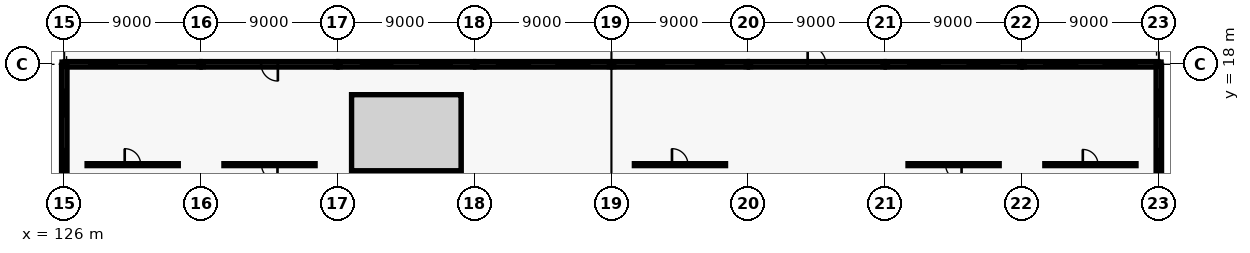
"""IFC4 building model, lengths in metres.
Left out: names, types, materials, properties, quantities, classifications, styles, units other than length and angle.
Written with IfcOpenShell. Run it as: python <this file> out.ifc"""

import sys

from ifc_helpers import new_model, si_unit, direction, frame, frame_2d, origin, origin_2d, place, context, subcontext, project, spatial, rectangle, i_section, extrude, element, fill, save


model = new_model("IFC4")
c1 = context("Model", 3, precision=1e-05, world=origin(), true_north=direction((0.0, 1.0)))
c2 = subcontext(c1, "Body", "Model", "MODEL_VIEW")
j1 = project(units=[si_unit("LENGTHUNIT", "METRE"), si_unit("PLANEANGLEUNIT", "RADIAN")], contexts=[c1])
p1 = place(None, origin())
s1 = spatial("IfcSite", under=j1, at=p1, CompositionType="ELEMENT")
p2 = place(p1, origin())
s2 = spatial("IfcBuilding", under=s1, at=p2, CompositionType="ELEMENT")
p3 = place(p2, frame((0.0, 0.0, 9.6)))
s3 = spatial("IfcBuildingStorey", under=s2, at=p3, CompositionType="ELEMENT", Elevation=9.6)
for number, where, z_axis, x_axis in (
    (1, (126.0, 18.0, 0.0), (0.0, 0.0, 1.0), (1.0, 0.0, 0.0)),
    (2, (135.0, 18.0, 0.0), (0.0, 0.0, 1.0), (1.0, 0.0, 0.0)),
    (3, (144.0, 18.0, 0.0), (0.0, 0.0, 1.0), (1.0, 0.0, 0.0)),
    (4, (153.0, 18.0, 0.0), (0.0, 0.0, 1.0), (1.0, 0.0, 0.0)),
    (5, (162.0, 18.0, 0.0), (0.0, 0.0, 1.0), (1.0, 0.0, 0.0)),
    (6, (171.0, 18.0, 0.0), (0.0, 0.0, 1.0), (1.0, 0.0, 0.0)),
    (7, (180.0, 18.0, 0.0), (0.0, 0.0, 1.0), (1.0, 0.0, 0.0)),
    (8, (189.0, 18.0, 0.0), (0.0, 0.0, 1.0), (1.0, 0.0, 0.0)),
    (9, (198.0, 18.0, 0.0), (0.0, 0.0, 1.0), (1.0, 0.0, 0.0)),
):
    element("IfcColumn", number, at=place(p3, frame(where, z_axis=z_axis, x_axis=x_axis)), inside=s3, PredefinedType="COLUMN", context=c2, shape_type="SweptSolid", body=[
        extrude(i_section(OverallWidth=0.3, OverallDepth=0.3, WebThickness=0.011, FlangeThickness=0.019, FilletRadius=0.027, at=origin_2d()), origin(), (0.0, 0.0, 1.0), 3.9),
    ])
p4 = place(p3, frame((126.06, 18.0, 0.0), z_axis=(0.0, 0.0, 1.0), x_axis=(1.0, 0.0, 0.0)))
e10 = element("IfcWall", 10, at=p4, inside=s3, PredefinedType="SOLIDWALL", context=c2, shape_type="SweptSolid", body=[
    extrude(rectangle(XDim=8.88, YDim=0.36, at=frame_2d((4.44, 0.0))), origin(), (0.0, 0.0, 1.0), 3.25),
])
p5 = place(p4, frame((1.586, 0.0, 0.9)))
e11 = element("IfcOpeningElement", 11, at=p5, cuts=e10, PredefinedType="OPENING", context=c2, shape_type="SweptSolid", body=[
    extrude(rectangle(XDim=1.8, YDim=1.8, at=frame_2d((0.9, 0.9))), frame((0.0, 0.19, 0.0), z_axis=(0.0, -1.0, 0.0), x_axis=(1.0, 0.0, 0.0)), (0.0, 0.0, 1.0), 0.38),
])
p6 = place(p4, frame((5.494, 0.0, 0.9)))
e12 = element("IfcOpeningElement", 12, at=p6, cuts=e10, PredefinedType="OPENING", context=c2, shape_type="SweptSolid", body=[
    extrude(rectangle(XDim=1.8, YDim=1.8, at=frame_2d((0.9, 0.9))), frame((0.0, 0.19, 0.0), z_axis=(0.0, -1.0, 0.0), x_axis=(1.0, 0.0, 0.0)), (0.0, 0.0, 1.0), 0.38),
])
p7 = place(p3, frame((135.06, 18.0, 0.0), z_axis=(0.0, 0.0, 1.0), x_axis=(1.0, 0.0, 0.0)))
e13 = element("IfcWall", 13, at=p7, inside=s3, PredefinedType="SOLIDWALL", context=c2, shape_type="SweptSolid", body=[
    extrude(rectangle(XDim=8.88, YDim=0.36, at=frame_2d((4.44, 0.0))), origin(), (0.0, 0.0, 1.0), 3.25),
])
p8 = place(p7, frame((3.89, 0.0, 0.0)))
e14 = element("IfcOpeningElement", 14, at=p8, cuts=e13, PredefinedType="OPENING", context=c2, shape_type="SweptSolid", body=[
    extrude(rectangle(XDim=1.1, YDim=2.15, at=frame_2d((0.55, 1.075))), frame((0.0, 0.19, 0.0), z_axis=(0.0, -1.0, 0.0), x_axis=(1.0, 0.0, 0.0)), (0.0, 0.0, 1.0), 0.38),
])
p9 = place(p3, frame((144.06, 18.0, 0.0), z_axis=(0.0, 0.0, 1.0), x_axis=(1.0, 0.0, 0.0)))
e15 = element("IfcWall", 15, at=p9, inside=s3, PredefinedType="SOLIDWALL", context=c2, shape_type="SweptSolid", body=[
    extrude(rectangle(XDim=8.88, YDim=0.36, at=frame_2d((4.44, 0.0))), origin(), (0.0, 0.0, 1.0), 3.25),
])
p10 = place(p9, frame((1.461, 0.0, 0.9)))
e16 = element("IfcOpeningElement", 16, at=p10, cuts=e15, PredefinedType="OPENING", context=c2, shape_type="SweptSolid", body=[
    extrude(rectangle(XDim=2.05, YDim=1.9, at=frame_2d((1.025, 0.95))), frame((0.0, 0.19, 0.0), z_axis=(0.0, -1.0, 0.0), x_axis=(1.0, 0.0, 0.0)), (0.0, 0.0, 1.0), 0.38),
])
p11 = place(p9, frame((5.369, 0.0, 0.9)))
e17 = element("IfcOpeningElement", 17, at=p11, cuts=e15, PredefinedType="OPENING", context=c2, shape_type="SweptSolid", body=[
    extrude(rectangle(XDim=2.05, YDim=1.9, at=frame_2d((1.025, 0.95))), frame((0.0, 0.19, 0.0), z_axis=(0.0, -1.0, 0.0), x_axis=(1.0, 0.0, 0.0)), (0.0, 0.0, 1.0), 0.38),
])
p12 = place(p3, frame((153.06, 18.0, 0.0), z_axis=(0.0, 0.0, 1.0), x_axis=(1.0, 0.0, 0.0)))
e18 = element("IfcWall", 18, at=p12, inside=s3, PredefinedType="SOLIDWALL", context=c2, shape_type="SweptSolid", body=[
    extrude(rectangle(XDim=8.88, YDim=0.36, at=frame_2d((4.44, 0.0))), origin(), (0.0, 0.0, 1.0), 3.25),
])
p13 = place(p12, frame((1.411, 0.0, 0.9)))
e19 = element("IfcOpeningElement", 19, at=p13, cuts=e18, PredefinedType="OPENING", context=c2, shape_type="SweptSolid", body=[
    extrude(rectangle(XDim=2.15, YDim=1.75, at=frame_2d((1.075, 0.875))), frame((0.0, 0.19, 0.0), z_axis=(0.0, -1.0, 0.0), x_axis=(1.0, 0.0, 0.0)), (0.0, 0.0, 1.0), 0.38),
])
p14 = place(p12, frame((5.319, 0.0, 0.9)))
e20 = element("IfcOpeningElement", 20, at=p14, cuts=e18, PredefinedType="OPENING", context=c2, shape_type="SweptSolid", body=[
    extrude(rectangle(XDim=2.15, YDim=1.75, at=frame_2d((1.075, 0.875))), frame((0.0, 0.19, 0.0), z_axis=(0.0, -1.0, 0.0), x_axis=(1.0, 0.0, 0.0)), (0.0, 0.0, 1.0), 0.38),
])
p15 = place(p3, frame((162.06, 18.0, 0.0), z_axis=(0.0, 0.0, 1.0), x_axis=(1.0, 0.0, 0.0)))
e21 = element("IfcWall", 21, at=p15, inside=s3, PredefinedType="SOLIDWALL", context=c2, shape_type="SweptSolid", body=[
    extrude(rectangle(XDim=8.88, YDim=0.36, at=frame_2d((4.44, 0.0))), origin(), (0.0, 0.0, 1.0), 3.25),
])
p16 = place(p15, frame((1.586, 0.0, 0.9)))
e22 = element("IfcOpeningElement", 22, at=p16, cuts=e21, PredefinedType="OPENING", context=c2, shape_type="SweptSolid", body=[
    extrude(rectangle(XDim=1.8, YDim=1.8, at=frame_2d((0.9, 0.9))), frame((0.0, 0.19, 0.0), z_axis=(0.0, -1.0, 0.0), x_axis=(1.0, 0.0, 0.0)), (0.0, 0.0, 1.0), 0.38),
])
p17 = place(p15, frame((5.494, 0.0, 0.9)))
e23 = element("IfcOpeningElement", 23, at=p17, cuts=e21, PredefinedType="OPENING", context=c2, shape_type="SweptSolid", body=[
    extrude(rectangle(XDim=1.8, YDim=1.8, at=frame_2d((0.9, 0.9))), frame((0.0, 0.19, 0.0), z_axis=(0.0, -1.0, 0.0), x_axis=(1.0, 0.0, 0.0)), (0.0, 0.0, 1.0), 0.38),
])
p18 = place(p3, frame((171.06, 18.0, 0.0), z_axis=(0.0, 0.0, 1.0), x_axis=(1.0, 0.0, 0.0)))
e24 = element("IfcWall", 24, at=p18, inside=s3, PredefinedType="SOLIDWALL", context=c2, shape_type="SweptSolid", body=[
    extrude(rectangle(XDim=8.88, YDim=0.36, at=frame_2d((4.44, 0.0))), origin(), (0.0, 0.0, 1.0), 3.25),
])
p19 = place(p18, frame((3.84, 0.0, 0.0)))
e25 = element("IfcOpeningElement", 25, at=p19, cuts=e24, PredefinedType="OPENING", context=c2, shape_type="SweptSolid", body=[
    extrude(rectangle(XDim=1.2, YDim=2.15, at=frame_2d((0.6, 1.075))), frame((0.0, 0.19, 0.0), z_axis=(0.0, -1.0, 0.0), x_axis=(1.0, 0.0, 0.0)), (0.0, 0.0, 1.0), 0.38),
])
p20 = place(p3, frame((180.06, 18.0, 0.0), z_axis=(0.0, 0.0, 1.0), x_axis=(1.0, 0.0, 0.0)))
e26 = element("IfcWall", 26, at=p20, inside=s3, PredefinedType="SOLIDWALL", context=c2, shape_type="SweptSolid", body=[
    extrude(rectangle(XDim=8.88, YDim=0.36, at=frame_2d((4.44, 0.0))), origin(), (0.0, 0.0, 1.0), 3.25),
])
p21 = place(p20, frame((1.461, 0.0, 0.9)))
e27 = element("IfcOpeningElement", 27, at=p21, cuts=e26, PredefinedType="OPENING", context=c2, shape_type="SweptSolid", body=[
    extrude(rectangle(XDim=2.05, YDim=1.9, at=frame_2d((1.025, 0.95))), frame((0.0, 0.19, 0.0), z_axis=(0.0, -1.0, 0.0), x_axis=(1.0, 0.0, 0.0)), (0.0, 0.0, 1.0), 0.38),
])
p22 = place(p20, frame((5.369, 0.0, 0.9)))
e28 = element("IfcOpeningElement", 28, at=p22, cuts=e26, PredefinedType="OPENING", context=c2, shape_type="SweptSolid", body=[
    extrude(rectangle(XDim=2.05, YDim=1.9, at=frame_2d((1.025, 0.95))), frame((0.0, 0.19, 0.0), z_axis=(0.0, -1.0, 0.0), x_axis=(1.0, 0.0, 0.0)), (0.0, 0.0, 1.0), 0.38),
])
p23 = place(p3, frame((189.06, 18.0, 0.0), z_axis=(0.0, 0.0, 1.0), x_axis=(1.0, 0.0, 0.0)))
e29 = element("IfcWall", 29, at=p23, inside=s3, PredefinedType="SOLIDWALL", context=c2, shape_type="SweptSolid", body=[
    extrude(rectangle(XDim=8.88, YDim=0.36, at=frame_2d((4.44, 0.0))), origin(), (0.0, 0.0, 1.0), 3.25),
])
p24 = place(p23, frame((1.411, 0.0, 0.9)))
e30 = element("IfcOpeningElement", 30, at=p24, cuts=e29, PredefinedType="OPENING", context=c2, shape_type="SweptSolid", body=[
    extrude(rectangle(XDim=2.15, YDim=1.75, at=frame_2d((1.075, 0.875))), frame((0.0, 0.19, 0.0), z_axis=(0.0, -1.0, 0.0), x_axis=(1.0, 0.0, 0.0)), (0.0, 0.0, 1.0), 0.38),
])
p25 = place(p23, frame((5.319, 0.0, 0.9)))
e31 = element("IfcOpeningElement", 31, at=p25, cuts=e29, PredefinedType="OPENING", context=c2, shape_type="SweptSolid", body=[
    extrude(rectangle(XDim=2.15, YDim=1.75, at=frame_2d((1.075, 0.875))), frame((0.0, 0.19, 0.0), z_axis=(0.0, -1.0, 0.0), x_axis=(1.0, 0.0, 0.0)), (0.0, 0.0, 1.0), 0.38),
])
p26 = place(p3, frame((126.0, 9.06, 0.0), z_axis=(0.0, 0.0, 1.0), x_axis=(0.0, 1.0, 0.0)))
e32 = element("IfcWall", 32, at=p26, inside=s3, PredefinedType="SOLIDWALL", context=c2, shape_type="SweptSolid", body=[
    extrude(rectangle(XDim=8.88, YDim=0.36, at=frame_2d((4.44, 0.0))), origin(), (0.0, 0.0, 1.0), 3.25),
])
p27 = place(p26, frame((1.611, 0.0, 0.9)))
e33 = element("IfcOpeningElement", 33, at=p27, cuts=e32, PredefinedType="OPENING", context=c2, shape_type="SweptSolid", body=[
    extrude(rectangle(XDim=1.75, YDim=2.25, at=frame_2d((0.875, 1.125))), frame((0.0, 0.19, 0.0), z_axis=(0.0, -1.0, 0.0), x_axis=(1.0, 0.0, 0.0)), (0.0, 0.0, 1.0), 0.38),
])
p28 = place(p26, frame((5.519, 0.0, 0.9)))
e34 = element("IfcOpeningElement", 34, at=p28, cuts=e32, PredefinedType="OPENING", context=c2, shape_type="SweptSolid", body=[
    extrude(rectangle(XDim=1.75, YDim=2.25, at=frame_2d((0.875, 1.125))), frame((0.0, 0.19, 0.0), z_axis=(0.0, -1.0, 0.0), x_axis=(1.0, 0.0, 0.0)), (0.0, 0.0, 1.0), 0.38),
])
p29 = place(p3, frame((198.0, 9.06, 0.0), z_axis=(0.0, 0.0, 1.0), x_axis=(0.0, 1.0, 0.0)))
e35 = element("IfcWall", 35, at=p29, inside=s3, PredefinedType="SOLIDWALL", context=c2, shape_type="SweptSolid", body=[
    extrude(rectangle(XDim=8.88, YDim=0.36, at=frame_2d((4.44, 0.0))), origin(), (0.0, 0.0, 1.0), 3.25),
])
p30 = place(p29, frame((1.611, 0.0, 0.9)))
e36 = element("IfcOpeningElement", 36, at=p30, cuts=e35, PredefinedType="OPENING", context=c2, shape_type="SweptSolid", body=[
    extrude(rectangle(XDim=1.75, YDim=2.25, at=frame_2d((0.875, 1.125))), frame((0.0, 0.19, 0.0), z_axis=(0.0, -1.0, 0.0), x_axis=(1.0, 0.0, 0.0)), (0.0, 0.0, 1.0), 0.38),
])
p31 = place(p29, frame((5.519, 0.0, 0.9)))
e37 = element("IfcOpeningElement", 37, at=p31, cuts=e35, PredefinedType="OPENING", context=c2, shape_type="SweptSolid", body=[
    extrude(rectangle(XDim=1.75, YDim=2.25, at=frame_2d((0.875, 1.125))), frame((0.0, 0.19, 0.0), z_axis=(0.0, -1.0, 0.0), x_axis=(1.0, 0.0, 0.0)), (0.0, 0.0, 1.0), 0.38),
])
p32 = place(p3, frame((127.5, 11.4, 0.0), z_axis=(0.0, 0.0, 1.0), x_axis=(1.0, 0.0, 0.0)))
e38 = element("IfcWall", 38, at=p32, inside=s3, PredefinedType="PARTITIONING", context=c2, shape_type="SweptSolid", body=[
    extrude(rectangle(XDim=6.0, YDim=0.13, at=frame_2d((3.0, 0.0))), origin(), (0.0, 0.0, 1.0), 2.9),
])
p33 = place(p32, frame((2.475, 0.0, 0.0)))
e39 = element("IfcOpeningElement", 39, at=p33, cuts=e38, PredefinedType="OPENING", context=c2, shape_type="SweptSolid", body=[
    extrude(rectangle(XDim=1.05, YDim=2.15, at=frame_2d((0.525, 1.075))), frame((0.0, 0.075, 0.0), z_axis=(0.0, -1.0, 0.0), x_axis=(1.0, 0.0, 0.0)), (0.0, 0.0, 1.0), 0.15),
])
p34 = place(p3, frame((136.5, 11.4, 0.0), z_axis=(0.0, 0.0, 1.0), x_axis=(1.0, 0.0, 0.0)))
e40 = element("IfcWall", 40, at=p34, inside=s3, PredefinedType="PARTITIONING", context=c2, shape_type="SweptSolid", body=[
    extrude(rectangle(XDim=6.0, YDim=0.13, at=frame_2d((3.0, 0.0))), origin(), (0.0, 0.0, 1.0), 2.9),
])
p35 = place(p34, frame((2.475, 0.0, 0.0)))
e41 = element("IfcOpeningElement", 41, at=p35, cuts=e40, PredefinedType="OPENING", context=c2, shape_type="SweptSolid", body=[
    extrude(rectangle(XDim=1.05, YDim=2.15, at=frame_2d((0.525, 1.075))), frame((0.0, 0.075, 0.0), z_axis=(0.0, -1.0, 0.0), x_axis=(1.0, 0.0, 0.0)), (0.0, 0.0, 1.0), 0.15),
])
p36 = place(p3, frame((163.5, 11.4, 0.0), z_axis=(0.0, 0.0, 1.0), x_axis=(1.0, 0.0, 0.0)))
e42 = element("IfcWall", 42, at=p36, inside=s3, PredefinedType="PARTITIONING", context=c2, shape_type="SweptSolid", body=[
    extrude(rectangle(XDim=6.0, YDim=0.13, at=frame_2d((3.0, 0.0))), origin(), (0.0, 0.0, 1.0), 2.9),
])
p37 = place(p36, frame((2.475, 0.0, 0.0)))
e43 = element("IfcOpeningElement", 43, at=p37, cuts=e42, PredefinedType="OPENING", context=c2, shape_type="SweptSolid", body=[
    extrude(rectangle(XDim=1.05, YDim=2.15, at=frame_2d((0.525, 1.075))), frame((0.0, 0.075, 0.0), z_axis=(0.0, -1.0, 0.0), x_axis=(1.0, 0.0, 0.0)), (0.0, 0.0, 1.0), 0.15),
])
p38 = place(p3, frame((181.5, 11.4, 0.0), z_axis=(0.0, 0.0, 1.0), x_axis=(1.0, 0.0, 0.0)))
e44 = element("IfcWall", 44, at=p38, inside=s3, PredefinedType="PARTITIONING", context=c2, shape_type="SweptSolid", body=[
    extrude(rectangle(XDim=6.0, YDim=0.13, at=frame_2d((3.0, 0.0))), origin(), (0.0, 0.0, 1.0), 2.9),
])
p39 = place(p38, frame((2.475, 0.0, 0.0)))
e45 = element("IfcOpeningElement", 45, at=p39, cuts=e44, PredefinedType="OPENING", context=c2, shape_type="SweptSolid", body=[
    extrude(rectangle(XDim=1.05, YDim=2.15, at=frame_2d((0.525, 1.075))), frame((0.0, 0.075, 0.0), z_axis=(0.0, -1.0, 0.0), x_axis=(1.0, 0.0, 0.0)), (0.0, 0.0, 1.0), 0.15),
])
p40 = place(p3, frame((190.5, 11.4, 0.0), z_axis=(0.0, 0.0, 1.0), x_axis=(1.0, 0.0, 0.0)))
e46 = element("IfcWall", 46, at=p40, inside=s3, PredefinedType="PARTITIONING", context=c2, shape_type="SweptSolid", body=[
    extrude(rectangle(XDim=6.0, YDim=0.13, at=frame_2d((3.0, 0.0))), origin(), (0.0, 0.0, 1.0), 2.9),
])
p41 = place(p40, frame((2.5, 0.0, 0.0)))
e47 = element("IfcOpeningElement", 47, at=p41, cuts=e46, PredefinedType="OPENING", context=c2, shape_type="SweptSolid", body=[
    extrude(rectangle(XDim=1.0, YDim=2.1, at=frame_2d((0.5, 1.05))), frame((0.0, 0.075, 0.0), z_axis=(0.0, -1.0, 0.0), x_axis=(1.0, 0.0, 0.0)), (0.0, 0.0, 1.0), 0.15),
])
p42 = place(p5, origin())
e48 = element("IfcWindow", 48, at=p42, inside=s3, PartitioningType="SINGLE_PANEL", PredefinedType="WINDOW", context=c2, shape_type="SweptSolid", body=[
    extrude(rectangle(XDim=1.8, YDim=1.8, at=frame_2d((0.9, 0.9))), frame((0.0, 0.03, 0.0), z_axis=(0.0, -1.0, 0.0), x_axis=(1.0, 0.0, 0.0)), (0.0, 0.0, 1.0), 0.06),
])
fill(e11, e48)
p43 = place(p6, origin())
e49 = element("IfcWindow", 49, at=p43, inside=s3, PartitioningType="SINGLE_PANEL", PredefinedType="WINDOW", context=c2, shape_type="SweptSolid", body=[
    extrude(rectangle(XDim=1.8, YDim=1.8, at=frame_2d((0.9, 0.9))), frame((0.0, 0.03, 0.0), z_axis=(0.0, -1.0, 0.0), x_axis=(1.0, 0.0, 0.0)), (0.0, 0.0, 1.0), 0.06),
])
fill(e12, e49)
p44 = place(p8, origin())
e50 = element("IfcDoor", 50, at=p44, inside=s3, OperationType="SINGLE_SWING_RIGHT", PredefinedType="DOOR", context=c2, shape_type="SweptSolid", body=[
    extrude(rectangle(XDim=1.1, YDim=2.15, at=frame_2d((0.55, 1.075))), frame((0.0, 0.025, 0.0), z_axis=(0.0, -1.0, 0.0), x_axis=(1.0, 0.0, 0.0)), (0.0, 0.0, 1.0), 0.05),
])
fill(e14, e50)
p45 = place(p10, origin())
e51 = element("IfcWindow", 51, at=p45, inside=s3, PartitioningType="SINGLE_PANEL", PredefinedType="WINDOW", context=c2, shape_type="SweptSolid", body=[
    extrude(rectangle(XDim=2.05, YDim=1.9, at=frame_2d((1.025, 0.95))), frame((0.0, 0.03, 0.0), z_axis=(0.0, -1.0, 0.0), x_axis=(1.0, 0.0, 0.0)), (0.0, 0.0, 1.0), 0.06),
])
fill(e16, e51)
p46 = place(p11, origin())
e52 = element("IfcWindow", 52, at=p46, inside=s3, PartitioningType="SINGLE_PANEL", PredefinedType="WINDOW", context=c2, shape_type="SweptSolid", body=[
    extrude(rectangle(XDim=2.05, YDim=1.9, at=frame_2d((1.025, 0.95))), frame((0.0, 0.03, 0.0), z_axis=(0.0, -1.0, 0.0), x_axis=(1.0, 0.0, 0.0)), (0.0, 0.0, 1.0), 0.06),
])
fill(e17, e52)
p47 = place(p13, origin())
e53 = element("IfcWindow", 53, at=p47, inside=s3, PartitioningType="SINGLE_PANEL", PredefinedType="WINDOW", context=c2, shape_type="SweptSolid", body=[
    extrude(rectangle(XDim=2.15, YDim=1.75, at=frame_2d((1.075, 0.875))), frame((0.0, 0.03, 0.0), z_axis=(0.0, -1.0, 0.0), x_axis=(1.0, 0.0, 0.0)), (0.0, 0.0, 1.0), 0.06),
])
fill(e19, e53)
p48 = place(p14, origin())
e54 = element("IfcWindow", 54, at=p48, inside=s3, PartitioningType="SINGLE_PANEL", PredefinedType="WINDOW", context=c2, shape_type="SweptSolid", body=[
    extrude(rectangle(XDim=2.15, YDim=1.75, at=frame_2d((1.075, 0.875))), frame((0.0, 0.03, 0.0), z_axis=(0.0, -1.0, 0.0), x_axis=(1.0, 0.0, 0.0)), (0.0, 0.0, 1.0), 0.06),
])
fill(e20, e54)
p49 = place(p16, origin())
e55 = element("IfcWindow", 55, at=p49, inside=s3, PartitioningType="SINGLE_PANEL", PredefinedType="WINDOW", context=c2, shape_type="SweptSolid", body=[
    extrude(rectangle(XDim=1.8, YDim=1.8, at=frame_2d((0.9, 0.9))), frame((0.0, 0.03, 0.0), z_axis=(0.0, -1.0, 0.0), x_axis=(1.0, 0.0, 0.0)), (0.0, 0.0, 1.0), 0.06),
])
fill(e22, e55)
p50 = place(p17, origin())
e56 = element("IfcWindow", 56, at=p50, inside=s3, PartitioningType="SINGLE_PANEL", PredefinedType="WINDOW", context=c2, shape_type="SweptSolid", body=[
    extrude(rectangle(XDim=1.8, YDim=1.8, at=frame_2d((0.9, 0.9))), frame((0.0, 0.03, 0.0), z_axis=(0.0, -1.0, 0.0), x_axis=(1.0, 0.0, 0.0)), (0.0, 0.0, 1.0), 0.06),
])
fill(e23, e56)
p51 = place(p19, origin())
e57 = element("IfcDoor", 57, at=p51, inside=s3, OperationType="SINGLE_SWING_LEFT", PredefinedType="DOOR", context=c2, shape_type="SweptSolid", body=[
    extrude(rectangle(XDim=1.2, YDim=2.15, at=frame_2d((0.6, 1.075))), frame((0.0, 0.025, 0.0), z_axis=(0.0, -1.0, 0.0), x_axis=(1.0, 0.0, 0.0)), (0.0, 0.0, 1.0), 0.05),
])
fill(e25, e57)
p52 = place(p21, origin())
e58 = element("IfcWindow", 58, at=p52, inside=s3, PartitioningType="SINGLE_PANEL", PredefinedType="WINDOW", context=c2, shape_type="SweptSolid", body=[
    extrude(rectangle(XDim=2.05, YDim=1.9, at=frame_2d((1.025, 0.95))), frame((0.0, 0.03, 0.0), z_axis=(0.0, -1.0, 0.0), x_axis=(1.0, 0.0, 0.0)), (0.0, 0.0, 1.0), 0.06),
])
fill(e27, e58)
p53 = place(p22, origin())
e59 = element("IfcWindow", 59, at=p53, inside=s3, PartitioningType="SINGLE_PANEL", PredefinedType="WINDOW", context=c2, shape_type="SweptSolid", body=[
    extrude(rectangle(XDim=2.05, YDim=1.9, at=frame_2d((1.025, 0.95))), frame((0.0, 0.03, 0.0), z_axis=(0.0, -1.0, 0.0), x_axis=(1.0, 0.0, 0.0)), (0.0, 0.0, 1.0), 0.06),
])
fill(e28, e59)
p54 = place(p24, origin())
e60 = element("IfcWindow", 60, at=p54, inside=s3, PartitioningType="SINGLE_PANEL", PredefinedType="WINDOW", context=c2, shape_type="SweptSolid", body=[
    extrude(rectangle(XDim=2.15, YDim=1.75, at=frame_2d((1.075, 0.875))), frame((0.0, 0.03, 0.0), z_axis=(0.0, -1.0, 0.0), x_axis=(1.0, 0.0, 0.0)), (0.0, 0.0, 1.0), 0.06),
])
fill(e30, e60)
p55 = place(p25, origin())
e61 = element("IfcWindow", 61, at=p55, inside=s3, PartitioningType="SINGLE_PANEL", PredefinedType="WINDOW", context=c2, shape_type="SweptSolid", body=[
    extrude(rectangle(XDim=2.15, YDim=1.75, at=frame_2d((1.075, 0.875))), frame((0.0, 0.03, 0.0), z_axis=(0.0, -1.0, 0.0), x_axis=(1.0, 0.0, 0.0)), (0.0, 0.0, 1.0), 0.06),
])
fill(e31, e61)
p56 = place(p27, origin())
e62 = element("IfcWindow", 62, at=p56, inside=s3, PartitioningType="SINGLE_PANEL", PredefinedType="WINDOW", context=c2, shape_type="SweptSolid", body=[
    extrude(rectangle(XDim=1.75, YDim=2.25, at=frame_2d((0.875, 1.125))), frame((0.0, 0.03, 0.0), z_axis=(0.0, -1.0, 0.0), x_axis=(1.0, 0.0, 0.0)), (0.0, 0.0, 1.0), 0.06),
])
fill(e33, e62)
p57 = place(p28, origin())
e63 = element("IfcWindow", 63, at=p57, inside=s3, PartitioningType="SINGLE_PANEL", PredefinedType="WINDOW", context=c2, shape_type="SweptSolid", body=[
    extrude(rectangle(XDim=1.75, YDim=2.25, at=frame_2d((0.875, 1.125))), frame((0.0, 0.03, 0.0), z_axis=(0.0, -1.0, 0.0), x_axis=(1.0, 0.0, 0.0)), (0.0, 0.0, 1.0), 0.06),
])
fill(e34, e63)
p58 = place(p30, origin())
e64 = element("IfcWindow", 64, at=p58, inside=s3, PartitioningType="SINGLE_PANEL", PredefinedType="WINDOW", context=c2, shape_type="SweptSolid", body=[
    extrude(rectangle(XDim=1.75, YDim=2.25, at=frame_2d((0.875, 1.125))), frame((0.0, 0.03, 0.0), z_axis=(0.0, -1.0, 0.0), x_axis=(1.0, 0.0, 0.0)), (0.0, 0.0, 1.0), 0.06),
])
fill(e36, e64)
p59 = place(p31, origin())
e65 = element("IfcWindow", 65, at=p59, inside=s3, PartitioningType="SINGLE_PANEL", PredefinedType="WINDOW", context=c2, shape_type="SweptSolid", body=[
    extrude(rectangle(XDim=1.75, YDim=2.25, at=frame_2d((0.875, 1.125))), frame((0.0, 0.03, 0.0), z_axis=(0.0, -1.0, 0.0), x_axis=(1.0, 0.0, 0.0)), (0.0, 0.0, 1.0), 0.06),
])
fill(e37, e65)
p60 = place(p33, origin())
e66 = element("IfcDoor", 66, at=p60, inside=s3, OperationType="SINGLE_SWING_LEFT", PredefinedType="DOOR", context=c2, shape_type="SweptSolid", body=[
    extrude(rectangle(XDim=1.05, YDim=2.15, at=frame_2d((0.525, 1.075))), frame((0.0, 0.025, 0.0), z_axis=(0.0, -1.0, 0.0), x_axis=(1.0, 0.0, 0.0)), (0.0, 0.0, 1.0), 0.05),
])
fill(e39, e66)
p61 = place(p35, origin())
e67 = element("IfcDoor", 67, at=p61, inside=s3, OperationType="SINGLE_SWING_RIGHT", PredefinedType="DOOR", context=c2, shape_type="SweptSolid", body=[
    extrude(rectangle(XDim=1.05, YDim=2.15, at=frame_2d((0.525, 1.075))), frame((0.0, 0.025, 0.0), z_axis=(0.0, -1.0, 0.0), x_axis=(1.0, 0.0, 0.0)), (0.0, 0.0, 1.0), 0.05),
])
fill(e41, e67)
p62 = place(p37, origin())
e68 = element("IfcDoor", 68, at=p62, inside=s3, OperationType="SINGLE_SWING_LEFT", PredefinedType="DOOR", context=c2, shape_type="SweptSolid", body=[
    extrude(rectangle(XDim=1.05, YDim=2.15, at=frame_2d((0.525, 1.075))), frame((0.0, 0.025, 0.0), z_axis=(0.0, -1.0, 0.0), x_axis=(1.0, 0.0, 0.0)), (0.0, 0.0, 1.0), 0.05),
])
fill(e43, e68)
p63 = place(p39, origin())
e69 = element("IfcDoor", 69, at=p63, inside=s3, OperationType="SINGLE_SWING_RIGHT", PredefinedType="DOOR", context=c2, shape_type="SweptSolid", body=[
    extrude(rectangle(XDim=1.05, YDim=2.15, at=frame_2d((0.525, 1.075))), frame((0.0, 0.025, 0.0), z_axis=(0.0, -1.0, 0.0), x_axis=(1.0, 0.0, 0.0)), (0.0, 0.0, 1.0), 0.05),
])
fill(e45, e69)
p64 = place(p41, origin())
e70 = element("IfcDoor", 70, at=p64, inside=s3, OperationType="SINGLE_SWING_LEFT", PredefinedType="DOOR", context=c2, shape_type="SweptSolid", body=[
    extrude(rectangle(XDim=1.0, YDim=2.1, at=frame_2d((0.5, 1.05))), frame((0.0, 0.025, 0.0), z_axis=(0.0, -1.0, 0.0), x_axis=(1.0, 0.0, 0.0)), (0.0, 0.0, 1.0), 0.05),
])
fill(e47, e70)
save(model, sys.argv[1])
